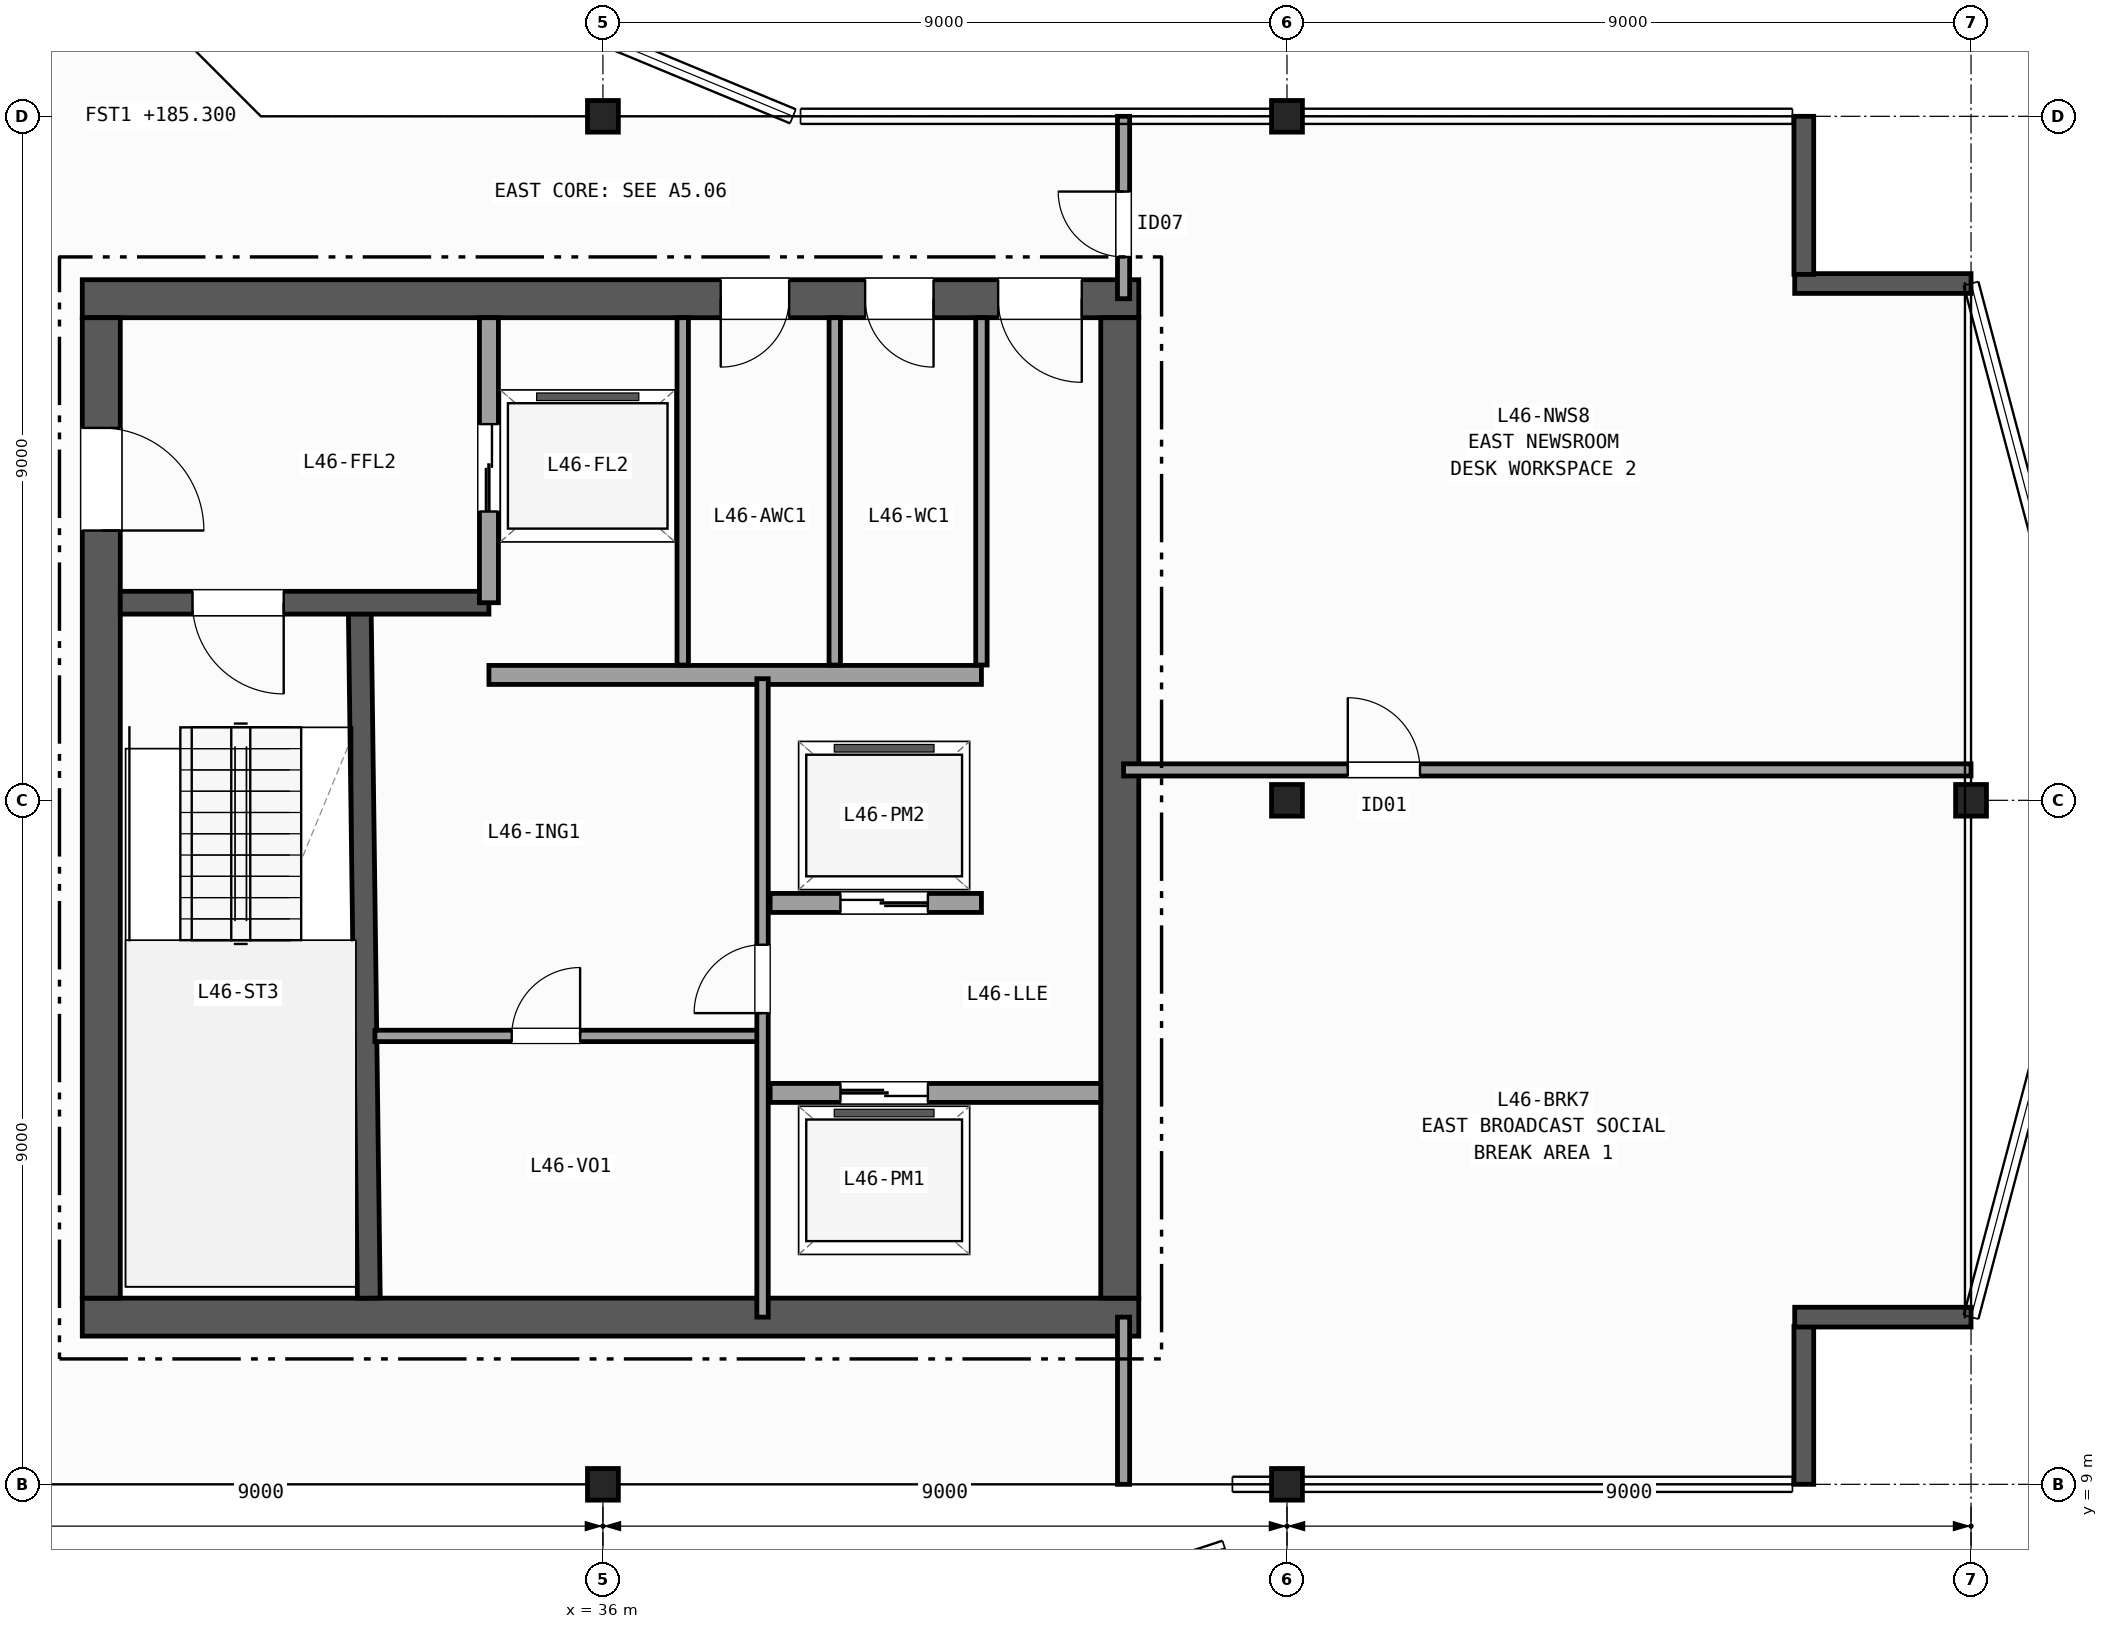
"""IFC4 building model, lengths in metres.
Left out: names, types, materials, properties, quantities, classifications, styles, units other than length and angle.
Written with IfcOpenShell. Run it as: python <this file> out.ifc"""

import sys

from ifc_helpers import new_model, si_unit, direction, frame, frame_2d, origin, origin_2d, place, context, subcontext, project, spatial, rectangle, i_section, extrude, element, fill, save


model = new_model("IFC4")
c1 = context("Model", 3, precision=1e-05, world=origin(), true_north=direction((0.0, 1.0)))
c2 = subcontext(c1, "Body", "Model", "MODEL_VIEW")
j1 = project(units=[si_unit("LENGTHUNIT", "METRE"), si_unit("PLANEANGLEUNIT", "RADIAN")], contexts=[c1])
p1 = place(None, origin())
s1 = spatial("IfcSite", under=j1, at=p1, CompositionType="ELEMENT")
p2 = place(p1, origin())
s2 = spatial("IfcBuilding", under=s1, at=p2, CompositionType="ELEMENT")
p3 = place(p2, frame((0.0, 0.0, 185.3)))
s3 = spatial("IfcBuildingStorey", under=s2, at=p3, CompositionType="ELEMENT", Elevation=185.3)
for number, where, z_axis, x_axis in (
    (1, (36.0, 9.0, 0.0), (0.0, 0.0, 1.0), (1.0, 0.0, 0.0)),
    (2, (36.0, 27.0, 0.0), (0.0, 0.0, 1.0), (1.0, 0.0, 0.0)),
    (3, (45.0, 9.0, 0.0), (0.0, 0.0, 1.0), (1.0, 0.0, 0.0)),
    (4, (45.0, 18.0, 0.0), (0.0, 0.0, 1.0), (1.0, 0.0, 0.0)),
    (5, (45.0, 27.0, 0.0), (0.0, 0.0, 1.0), (1.0, 0.0, 0.0)),
    (6, (54.0, 18.0, 0.0), (0.0, 0.0, 1.0), (1.0, 0.0, 0.0)),
):
    element("IfcColumn", number, at=place(p3, frame(where, z_axis=z_axis, x_axis=x_axis)), inside=s3, PredefinedType="COLUMN", context=c2, shape_type="SweptSolid", body=[
        extrude(i_section(OverallWidth=0.406, OverallDepth=0.416, WebThickness=0.03, FlangeThickness=0.048, FilletRadius=0.015, at=origin_2d()), origin(), (0.0, 0.0, 1.0), 3.7),
    ])
p4 = place(p3, frame((51.8, 9.0, 0.0), z_axis=(0.0, 0.0, 1.0), x_axis=(0.0, 1.0, 0.0)))
e7 = element("IfcWall", 7, at=p4, inside=s3, PredefinedType="SOLIDWALL", context=c2, shape_type="SweptSolid", body=[
    extrude(rectangle(XDim=2.08, YDim=0.26, at=frame_2d((1.04, 0.0))), origin(), (0.0, 0.0, 1.0), 3.42),
])
for number, where, z_axis, x_axis in (
    (8, (51.68, 11.2, 0.0), (0.0, 0.0, 1.0), (1.0, 0.0, 0.0)),
    (9, (54.0, 24.8, 0.0), (0.0, 0.0, 1.0), (-1.0, 0.0, 0.0)),
):
    element("IfcWall", number, at=place(p3, frame(where, z_axis=z_axis, x_axis=x_axis)), inside=s3, PredefinedType="SOLIDWALL", context=c2, shape_type="SweptSolid", body=[
        extrude(rectangle(XDim=2.32, YDim=0.26, at=frame_2d((1.16, 0.0))), origin(), (0.0, 0.0, 1.0), 3.42),
    ])
p5 = place(p3, frame((51.8, 24.92, 0.0), z_axis=(0.0, 0.0, 1.0), x_axis=(0.0, 1.0, 0.0)))
e10 = element("IfcWall", 10, at=p5, inside=s3, PredefinedType="SOLIDWALL", context=c2, shape_type="SweptSolid", body=[
    extrude(rectangle(XDim=2.08, YDim=0.26, at=frame_2d((1.04, 0.0))), origin(), (0.0, 0.0, 1.0), 3.42),
])
p6 = place(p3, frame((29.15, 11.2, 0.0), z_axis=(0.0, 0.0, 1.0), x_axis=(1.0, 0.0, 0.0)))
e11 = element("IfcWall", 11, at=p6, inside=s3, PredefinedType="SHEAR", context=c2, shape_type="SweptSolid", body=[
    extrude(rectangle(XDim=13.9, YDim=0.5, at=frame_2d((6.95, 0.0))), origin(), (0.0, 0.0, 1.0), 3.42),
])
p7 = place(p3, frame((43.05, 24.6, 0.0), z_axis=(0.0, 0.0, 1.0), x_axis=(-1.0, 0.0, 0.0)))
e12 = element("IfcWall", 12, at=p7, inside=s3, PredefinedType="SHEAR", context=c2, shape_type="SweptSolid", body=[
    extrude(rectangle(XDim=13.9, YDim=0.5, at=frame_2d((6.95, 0.0))), origin(), (0.0, 0.0, 1.0), 3.42),
])
p8 = place(p7, frame((0.75, 0.0, 0.0)))
e13 = element("IfcOpeningElement", 13, at=p8, cuts=e12, PredefinedType="OPENING", context=c2, shape_type="SweptSolid", body=[
    extrude(rectangle(XDim=1.1, YDim=2.15, at=frame_2d((0.55, 1.075))), frame((0.0, 0.26, 0.0), z_axis=(0.0, -1.0, 0.0), x_axis=(1.0, 0.0, 0.0)), (0.0, 0.0, 1.0), 0.52),
])
p9 = place(p7, frame((2.7, 0.0, 0.0)))
e14 = element("IfcOpeningElement", 14, at=p9, cuts=e12, PredefinedType="OPENING", context=c2, shape_type="SweptSolid", body=[
    extrude(rectangle(XDim=0.9, YDim=2.1, at=frame_2d((0.45, 1.05))), frame((0.0, 0.26, 0.0), z_axis=(0.0, -1.0, 0.0), x_axis=(1.0, 0.0, 0.0)), (0.0, 0.0, 1.0), 0.52),
])
p10 = place(p7, frame((4.6, 0.0, 0.0)))
e15 = element("IfcOpeningElement", 15, at=p10, cuts=e12, PredefinedType="OPENING", context=c2, shape_type="SweptSolid", body=[
    extrude(rectangle(XDim=0.9, YDim=2.1, at=frame_2d((0.45, 1.05))), frame((0.0, 0.26, 0.0), z_axis=(0.0, -1.0, 0.0), x_axis=(1.0, 0.0, 0.0)), (0.0, 0.0, 1.0), 0.52),
])
p11 = place(p3, frame((29.4, 24.35, 0.0), z_axis=(0.0, 0.0, 1.0), x_axis=(0.0, -1.0, 0.0)))
e16 = element("IfcWall", 16, at=p11, inside=s3, PredefinedType="SHEAR", context=c2, shape_type="SweptSolid", body=[
    extrude(rectangle(XDim=12.9, YDim=0.5, at=frame_2d((6.45, 0.0))), origin(), (0.0, 0.0, 1.0), 3.42),
])
p12 = place(p11, frame((1.45, 0.0, 0.0)))
e17 = element("IfcOpeningElement", 17, at=p12, cuts=e16, PredefinedType="OPENING", context=c2, shape_type="SweptSolid", body=[
    extrude(rectangle(XDim=1.35, YDim=2.15, at=frame_2d((0.675, 1.075))), frame((0.0, 0.26, 0.0), z_axis=(0.0, -1.0, 0.0), x_axis=(1.0, 0.0, 0.0)), (0.0, 0.0, 1.0), 0.52),
])
p13 = place(p3, frame((42.8, 11.45, 0.0), z_axis=(0.0, 0.0, 1.0), x_axis=(0.0, 1.0, 0.0)))
e18 = element("IfcWall", 18, at=p13, inside=s3, PredefinedType="SHEAR", context=c2, shape_type="SweptSolid", body=[
    extrude(rectangle(XDim=12.9, YDim=0.5, at=frame_2d((6.45, 0.0))), origin(), (0.0, 0.0, 1.0), 3.42),
])
p14 = place(p3, frame((32.92, 11.45, 0.0), z_axis=(0.0, 0.0, 1.0), x_axis=(-0.013171578211, 0.999913251001, 0.0)))
e19 = element("IfcWall", 19, at=p14, inside=s3, PredefinedType="SHEAR", context=c2, shape_type="SweptSolid", body=[
    extrude(rectangle(XDim=9.101, YDim=0.3, at=frame_2d((4.55, 0.0))), origin(), (0.0, 0.0, 1.0), 3.42),
])
p15 = place(p3, frame((34.5, 20.6, 0.0), z_axis=(0.0, 0.0, 1.0), x_axis=(-1.0, 0.0, 0.0)))
e20 = element("IfcWall", 20, at=p15, inside=s3, PredefinedType="SHEAR", context=c2, shape_type="SweptSolid", body=[
    extrude(rectangle(XDim=4.85, YDim=0.3, at=frame_2d((2.425, 0.0))), origin(), (0.0, 0.0, 1.0), 3.42),
])
p16 = place(p15, frame((2.7, 0.0, 0.0)))
e21 = element("IfcOpeningElement", 21, at=p16, cuts=e20, PredefinedType="OPENING", context=c2, shape_type="SweptSolid", body=[
    extrude(rectangle(XDim=1.2, YDim=2.15, at=frame_2d((0.6, 1.075))), frame((0.0, 0.16, 0.0), z_axis=(0.0, -1.0, 0.0), x_axis=(1.0, 0.0, 0.0)), (0.0, 0.0, 1.0), 0.32),
])
p17 = place(p3, frame((34.5, 20.6, 0.0), z_axis=(0.0, 0.0, 1.0), x_axis=(0.0, 1.0, 0.0)))
e22 = element("IfcWall", 22, at=p17, inside=s3, PredefinedType="PARTITIONING", context=c2, shape_type="SweptSolid", body=[
    extrude(rectangle(XDim=3.75, YDim=0.25, at=frame_2d((1.875, 0.0))), origin(), (0.0, 0.0, 1.0), 3.42),
])
p18 = place(p17, frame((1.2, 0.0, 0.0)))
e23 = element("IfcOpeningElement", 23, at=p18, cuts=e22, PredefinedType="OPENING", context=c2, shape_type="SweptSolid", body=[
    extrude(rectangle(XDim=1.15, YDim=2.15, at=frame_2d((0.575, 1.075))), frame((0.0, 0.135, 0.0), z_axis=(0.0, -1.0, 0.0), x_axis=(1.0, 0.0, 0.0)), (0.0, 0.0, 1.0), 0.27),
])
p19 = place(p3, frame((34.5, 19.65, 0.0), z_axis=(0.0, 0.0, 1.0), x_axis=(1.0, 0.0, 0.0)))
e24 = element("IfcWall", 24, at=p19, inside=s3, PredefinedType="PARTITIONING", context=c2, shape_type="SweptSolid", body=[
    extrude(rectangle(XDim=6.48, YDim=0.25, at=frame_2d((3.24, 0.0))), origin(), (0.0, 0.0, 1.0), 3.42),
])
p20 = place(p3, frame((38.2, 14.15, 0.0), z_axis=(0.0, 0.0, 1.0), x_axis=(1.0, 0.0, 0.0)))
e25 = element("IfcWall", 25, at=p20, inside=s3, PredefinedType="PARTITIONING", context=c2, shape_type="SweptSolid", body=[
    extrude(rectangle(XDim=4.35, YDim=0.25, at=frame_2d((2.175, 0.0))), origin(), (0.0, 0.0, 1.0), 3.42),
])
p21 = place(p20, frame((0.925, 0.0, 0.0)))
e26 = element("IfcOpeningElement", 26, at=p21, cuts=e25, PredefinedType="OPENING", context=c2, shape_type="SweptSolid", body=[
    extrude(rectangle(XDim=1.15, YDim=2.15, at=frame_2d((0.575, 1.075))), frame((0.0, 0.135, 0.0), z_axis=(0.0, -1.0, 0.0), x_axis=(1.0, 0.0, 0.0)), (0.0, 0.0, 1.0), 0.27),
])
p22 = place(p3, frame((40.98, 16.65, 0.0), z_axis=(0.0, 0.0, 1.0), x_axis=(-1.0, 0.0, 0.0)))
e27 = element("IfcWall", 27, at=p22, inside=s3, PredefinedType="PARTITIONING", context=c2, shape_type="SweptSolid", body=[
    extrude(rectangle(XDim=2.78, YDim=0.25, at=frame_2d((1.39, 0.0))), origin(), (0.0, 0.0, 1.0), 3.42),
])
p23 = place(p22, frame((0.705, 0.0, 0.0)))
e28 = element("IfcOpeningElement", 28, at=p23, cuts=e27, PredefinedType="OPENING", context=c2, shape_type="SweptSolid", body=[
    extrude(rectangle(XDim=1.15, YDim=2.15, at=frame_2d((0.575, 1.075))), frame((0.0, 0.135, 0.0), z_axis=(0.0, -1.0, 0.0), x_axis=(1.0, 0.0, 0.0)), (0.0, 0.0, 1.0), 0.27),
])
p24 = place(p3, frame((33.0, 14.9, 0.0), z_axis=(0.0, 0.0, 1.0), x_axis=(1.0, 0.0, 0.0)))
e29 = element("IfcWall", 29, at=p24, inside=s3, PredefinedType="PARTITIONING", context=c2, shape_type="SweptSolid", body=[
    extrude(rectangle(XDim=5.1, YDim=0.15, at=frame_2d((2.55, 0.0))), origin(), (0.0, 0.0, 1.0), 3.42),
])
p25 = place(p24, frame((1.8, 0.0, 0.0)))
e30 = element("IfcOpeningElement", 30, at=p25, cuts=e29, PredefinedType="OPENING", context=c2, shape_type="SweptSolid", body=[
    extrude(rectangle(XDim=0.9, YDim=2.1, at=frame_2d((0.45, 1.05))), frame((0.0, 0.085, 0.0), z_axis=(0.0, -1.0, 0.0), x_axis=(1.0, 0.0, 0.0)), (0.0, 0.0, 1.0), 0.17),
])
p26 = place(p3, frame((38.1, 11.2, 0.0), z_axis=(0.0, 0.0, 1.0), x_axis=(0.0, 1.0, 0.0)))
e31 = element("IfcWall", 31, at=p26, inside=s3, PredefinedType="PARTITIONING", context=c2, shape_type="SweptSolid", body=[
    extrude(rectangle(XDim=8.4, YDim=0.15, at=frame_2d((4.2, 0.0))), origin(), (0.0, 0.0, 1.0), 3.42),
])
p27 = place(p26, frame((4.0, 0.0, 0.0)))
e32 = element("IfcOpeningElement", 32, at=p27, cuts=e31, PredefinedType="OPENING", context=c2, shape_type="SweptSolid", body=[
    extrude(rectangle(XDim=0.9, YDim=2.1, at=frame_2d((0.45, 1.05))), frame((0.0, 0.085, 0.0), z_axis=(0.0, -1.0, 0.0), x_axis=(1.0, 0.0, 0.0)), (0.0, 0.0, 1.0), 0.17),
])
for number, where, z_axis, x_axis in (
    (33, (37.05, 19.78, 0.0), (0.0, 0.0, 1.0), (0.0, 1.0, 0.0)),
    (34, (39.05, 19.78, 0.0), (0.0, 0.0, 1.0), (0.0, 1.0, 0.0)),
    (35, (40.98, 19.78, 0.0), (0.0, 0.0, 1.0), (0.0, 1.0, 0.0)),
):
    element("IfcWall", number, at=place(p3, frame(where, z_axis=z_axis, x_axis=x_axis)), inside=s3, PredefinedType="PARTITIONING", context=c2, shape_type="SweptSolid", body=[
        extrude(rectangle(XDim=4.57, YDim=0.15, at=frame_2d((2.285, 0.0))), origin(), (0.0, 0.0, 1.0), 3.42),
    ])
p28 = place(p3, frame((42.85, 9.0, 0.0), z_axis=(0.0, 0.0, 1.0), x_axis=(0.0, 1.0, 0.0)))
e36 = element("IfcWall", 36, at=p28, inside=s3, PredefinedType="PARTITIONING", context=c2, shape_type="SweptSolid", body=[
    extrude(rectangle(XDim=2.2, YDim=0.16, at=frame_2d((1.1, 0.0))), origin(), (0.0, 0.0, 1.0), 2.634),
])
p29 = place(p3, frame((42.85, 24.6, 0.0), z_axis=(0.0, 0.0, 1.0), x_axis=(0.0, 1.0, 0.0)))
e37 = element("IfcWall", 37, at=p29, inside=s3, PredefinedType="PARTITIONING", context=c2, shape_type="SweptSolid", body=[
    extrude(rectangle(XDim=2.4, YDim=0.16, at=frame_2d((1.2, 0.0))), origin(), (0.0, 0.0, 1.0), 2.634),
])
p30 = place(p29, frame((0.55, 0.0, 0.0)))
e38 = element("IfcOpeningElement", 38, at=p30, cuts=e37, PredefinedType="OPENING", context=c2, shape_type="SweptSolid", body=[
    extrude(rectangle(XDim=0.86, YDim=2.05, at=frame_2d((0.43, 1.025))), frame((0.0, 0.09, 0.0), z_axis=(0.0, -1.0, 0.0), x_axis=(1.0, 0.0, 0.0)), (0.0, 0.0, 1.0), 0.18),
])
p31 = place(p3, frame((42.85, 18.4, 0.0), z_axis=(0.0, 0.0, 1.0), x_axis=(1.0, 0.0, 0.0)))
e39 = element("IfcWall", 39, at=p31, inside=s3, PredefinedType="PARTITIONING", context=c2, shape_type="SweptSolid", body=[
    extrude(rectangle(XDim=11.15, YDim=0.16, at=frame_2d((5.575, 0.0))), origin(), (0.0, 0.0, 1.0), 3.42),
])
p32 = place(p31, frame((2.95, 0.0, 0.0)))
e40 = element("IfcOpeningElement", 40, at=p32, cuts=e39, PredefinedType="OPENING", context=c2, shape_type="SweptSolid", body=[
    extrude(rectangle(XDim=0.95, YDim=2.1, at=frame_2d((0.475, 1.05))), frame((0.0, 0.09, 0.0), z_axis=(0.0, -1.0, 0.0), x_axis=(1.0, 0.0, 0.0)), (0.0, 0.0, 1.0), 0.18),
])
p33 = place(p16, origin())
e41 = element("IfcDoor", 41, at=p33, inside=s3, OperationType="SINGLE_SWING_LEFT", PredefinedType="DOOR", context=c2, shape_type="SweptSolid", body=[
    extrude(rectangle(XDim=1.2, YDim=2.15, at=frame_2d((0.6, 1.075))), frame((0.0, 0.025, 0.0), z_axis=(0.0, -1.0, 0.0), x_axis=(1.0, 0.0, 0.0)), (0.0, 0.0, 1.0), 0.05),
])
fill(e21, e41)
p34 = place(p12, origin())
e42 = element("IfcDoor", 42, at=p34, inside=s3, OperationType="SINGLE_SWING_RIGHT", PredefinedType="DOOR", context=c2, shape_type="SweptSolid", body=[
    extrude(rectangle(XDim=1.35, YDim=2.15, at=frame_2d((0.675, 1.075))), frame((0.0, 0.025, 0.0), z_axis=(0.0, -1.0, 0.0), x_axis=(1.0, 0.0, 0.0)), (0.0, 0.0, 1.0), 0.05),
])
fill(e17, e42)
p35 = place(p8, origin())
e43 = element("IfcDoor", 43, at=p35, inside=s3, OperationType="SINGLE_SWING_LEFT", PredefinedType="DOOR", context=c2, shape_type="SweptSolid", body=[
    extrude(rectangle(XDim=1.1, YDim=2.15, at=frame_2d((0.55, 1.075))), frame((0.0, 0.025, 0.0), z_axis=(0.0, -1.0, 0.0), x_axis=(1.0, 0.0, 0.0)), (0.0, 0.0, 1.0), 0.05),
])
fill(e13, e43)
p36 = place(p9, origin())
e44 = element("IfcDoor", 44, at=p36, inside=s3, OperationType="SINGLE_SWING_LEFT", PredefinedType="DOOR", context=c2, shape_type="SweptSolid", body=[
    extrude(rectangle(XDim=0.9, YDim=2.1, at=frame_2d((0.45, 1.05))), frame((0.0, 0.025, 0.0), z_axis=(0.0, -1.0, 0.0), x_axis=(1.0, 0.0, 0.0)), (0.0, 0.0, 1.0), 0.05),
])
fill(e14, e44)
p37 = place(p10, origin())
e45 = element("IfcDoor", 45, at=p37, inside=s3, OperationType="SINGLE_SWING_RIGHT", PredefinedType="DOOR", context=c2, shape_type="SweptSolid", body=[
    extrude(rectangle(XDim=0.9, YDim=2.1, at=frame_2d((0.45, 1.05))), frame((0.0, 0.025, 0.0), z_axis=(0.0, -1.0, 0.0), x_axis=(1.0, 0.0, 0.0)), (0.0, 0.0, 1.0), 0.05),
])
fill(e15, e45)
p38 = place(p18, origin())
e46 = element("IfcDoor", 46, at=p38, inside=s3, OperationType="DOUBLE_DOOR_SLIDING", PredefinedType="DOOR", context=c2, shape_type="SweptSolid", body=[
    extrude(rectangle(XDim=1.15, YDim=2.15, at=frame_2d((0.575, 1.075))), frame((0.0, 0.025, 0.0), z_axis=(0.0, -1.0, 0.0), x_axis=(1.0, 0.0, 0.0)), (0.0, 0.0, 1.0), 0.05),
])
fill(e23, e46)
p39 = place(p21, origin())
e47 = element("IfcDoor", 47, at=p39, inside=s3, OperationType="DOUBLE_DOOR_SLIDING", PredefinedType="DOOR", context=c2, shape_type="SweptSolid", body=[
    extrude(rectangle(XDim=1.15, YDim=2.15, at=frame_2d((0.575, 1.075))), frame((0.0, 0.025, 0.0), z_axis=(0.0, -1.0, 0.0), x_axis=(1.0, 0.0, 0.0)), (0.0, 0.0, 1.0), 0.05),
])
fill(e26, e47)
p40 = place(p23, origin())
e48 = element("IfcDoor", 48, at=p40, inside=s3, OperationType="DOUBLE_DOOR_SLIDING", PredefinedType="DOOR", context=c2, shape_type="SweptSolid", body=[
    extrude(rectangle(XDim=1.15, YDim=2.15, at=frame_2d((0.575, 1.075))), frame((0.0, 0.025, 0.0), z_axis=(0.0, -1.0, 0.0), x_axis=(1.0, 0.0, 0.0)), (0.0, 0.0, 1.0), 0.05),
])
fill(e28, e48)
p41 = place(p27, origin())
e49 = element("IfcDoor", 49, at=p41, inside=s3, OperationType="SINGLE_SWING_LEFT", PredefinedType="DOOR", context=c2, shape_type="SweptSolid", body=[
    extrude(rectangle(XDim=0.9, YDim=2.1, at=frame_2d((0.45, 1.05))), frame((0.0, 0.025, 0.0), z_axis=(0.0, -1.0, 0.0), x_axis=(1.0, 0.0, 0.0)), (0.0, 0.0, 1.0), 0.05),
])
fill(e32, e49)
p42 = place(p25, origin())
e50 = element("IfcDoor", 50, at=p42, inside=s3, OperationType="SINGLE_SWING_RIGHT", PredefinedType="DOOR", context=c2, shape_type="SweptSolid", body=[
    extrude(rectangle(XDim=0.9, YDim=2.1, at=frame_2d((0.45, 1.05))), frame((0.0, 0.025, 0.0), z_axis=(0.0, -1.0, 0.0), x_axis=(1.0, 0.0, 0.0)), (0.0, 0.0, 1.0), 0.05),
])
fill(e30, e50)
p43 = place(p30, origin())
e51 = element("IfcDoor", 51, at=p43, inside=s3, OperationType="SINGLE_SWING_RIGHT", PredefinedType="DOOR", context=c2, shape_type="SweptSolid", body=[
    extrude(rectangle(XDim=0.86, YDim=2.05, at=frame_2d((0.43, 1.025))), frame((0.0, 0.025, 0.0), z_axis=(0.0, -1.0, 0.0), x_axis=(1.0, 0.0, 0.0)), (0.0, 0.0, 1.0), 0.05),
])
fill(e38, e51)
p44 = place(p32, origin())
e52 = element("IfcDoor", 52, at=p44, inside=s3, OperationType="SINGLE_SWING_LEFT", PredefinedType="DOOR", context=c2, shape_type="SweptSolid", body=[
    extrude(rectangle(XDim=0.95, YDim=2.1, at=frame_2d((0.475, 1.05))), frame((0.0, 0.025, 0.0), z_axis=(0.0, -1.0, 0.0), x_axis=(1.0, 0.0, 0.0)), (0.0, 0.0, 1.0), 0.05),
])
fill(e40, e52)
save(model, sys.argv[1])
